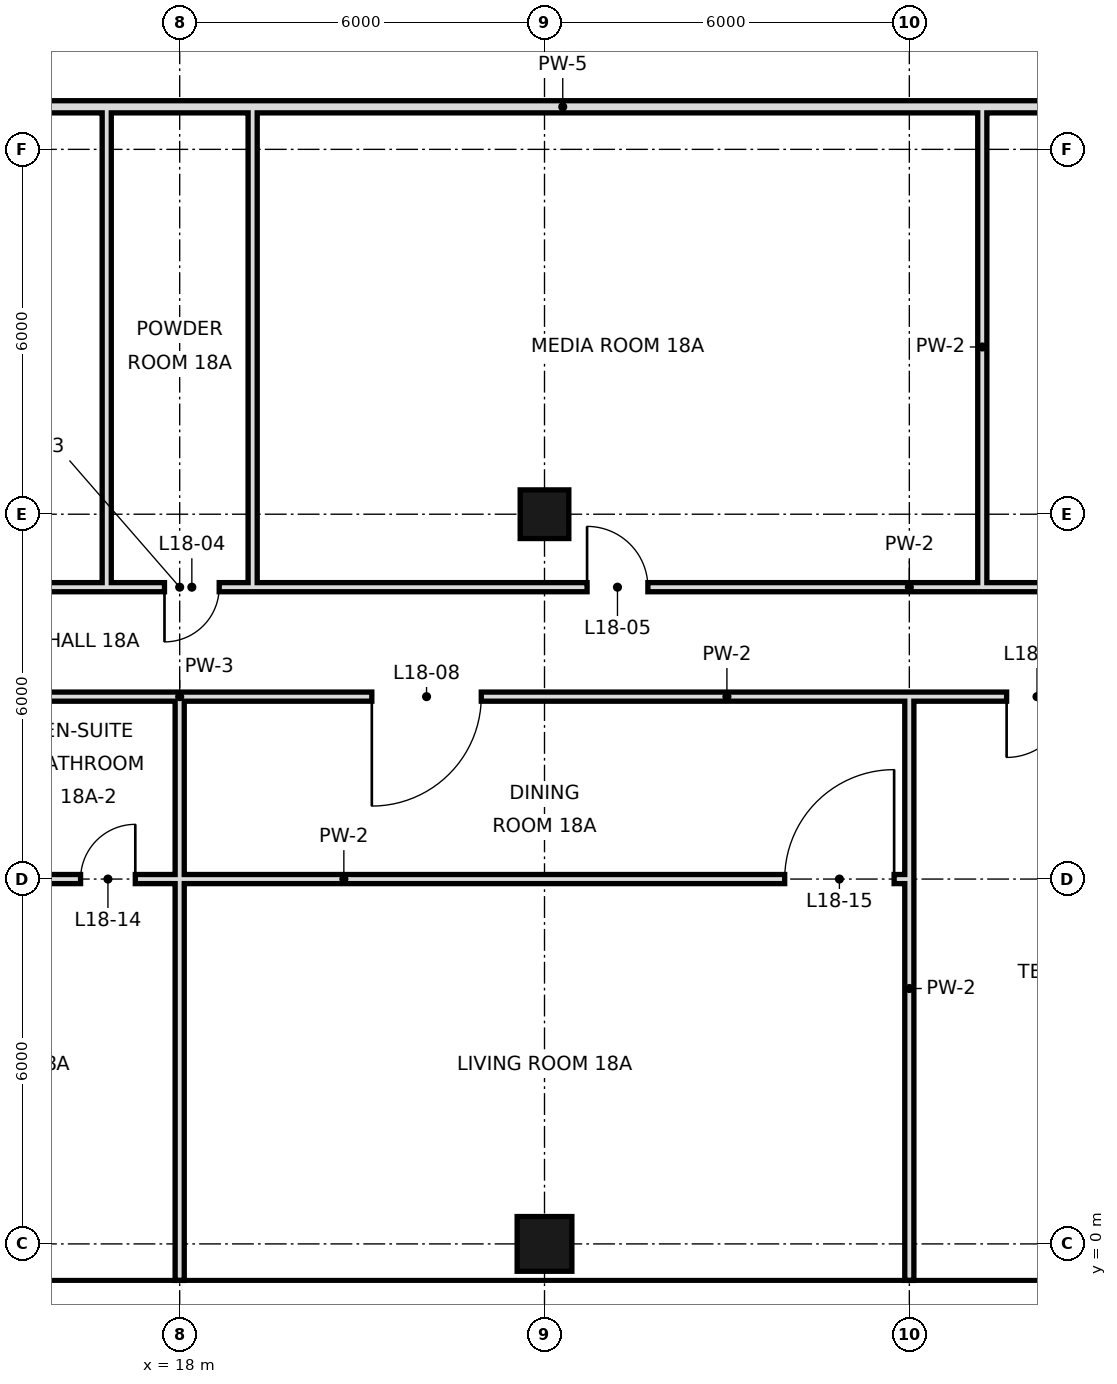
"""IFC4 building model, lengths in metres.
Left out: names, types, materials, properties, quantities, classifications, styles, units other than length and angle.
Written with IfcOpenShell. Run it as: python <this file> out.ifc"""

import sys

from ifc_helpers import new_model, si_unit, direction, frame, frame_2d, origin, origin_2d, place, context, subcontext, project, spatial, rectangle, hollow_rectangle, extrude, element, fill, save


model = new_model("IFC4")
c1 = context("Model", 3, precision=1e-05, world=origin(), true_north=direction((0.0, 1.0)))
c2 = subcontext(c1, "Body", "Model", "MODEL_VIEW")
j1 = project(units=[si_unit("LENGTHUNIT", "METRE"), si_unit("PLANEANGLEUNIT", "RADIAN")], contexts=[c1])
p1 = place(None, origin())
s1 = spatial("IfcSite", under=j1, at=p1, CompositionType="ELEMENT")
p2 = place(p1, origin())
s2 = spatial("IfcBuilding", under=s1, at=p2, CompositionType="ELEMENT")
p3 = place(p2, frame((0.0, 0.0, 85.8)))
s3 = spatial("IfcBuildingStorey", under=s2, at=p3, CompositionType="ELEMENT", Elevation=85.8)
p4 = place(p3, frame((24.0, 0.0, 0.0), z_axis=(0.0, 0.0, 1.0), x_axis=(1.0, 0.0, 0.0)))
e1 = element("IfcColumn", 1, at=p4, inside=s3, PredefinedType="COLUMN", context=c2, shape_type="SweptSolid", body=[
    extrude(hollow_rectangle(XDim=0.9, YDim=0.9, WallThickness=0.045, at=origin_2d()), origin(), (0.0, 0.0, 1.0), 4.4),
])
p5 = place(p3, frame((24.0, 12.0, 0.0), z_axis=(0.0, 0.0, 1.0), x_axis=(1.0, 0.0, 0.0)))
e2 = element("IfcColumn", 2, at=p5, inside=s3, PredefinedType="COLUMN", context=c2, shape_type="SweptSolid", body=[
    extrude(hollow_rectangle(XDim=0.8, YDim=0.8, WallThickness=0.04, at=origin_2d()), origin(), (0.0, 0.0, 1.0), 4.4),
])
p6 = place(p3, frame((16.8, 10.8, 0.0), z_axis=(0.0, 0.0, 1.0), x_axis=(0.0, 1.0, 0.0)))
e3 = element("IfcWall", 3, at=p6, inside=s3, PredefinedType="PARTITIONING", context=c2, shape_type="SweptSolid", body=[
    extrude(rectangle(XDim=7.9, YDim=0.15, at=frame_2d((3.95, 0.0))), origin(), (0.0, 0.0, 1.0), 4.1),
])
p7 = place(p3, frame((18.0, -0.6, 0.0), z_axis=(0.0, 0.0, 1.0), x_axis=(0.0, 1.0, 0.0)))
e4 = element("IfcWall", 4, at=p7, inside=s3, PredefinedType="PARTITIONING", context=c2, shape_type="SweptSolid", body=[
    extrude(rectangle(XDim=6.6, YDim=0.15, at=frame_2d((3.3, 0.0))), origin(), (0.0, 0.0, 1.0), 3.4),
])
p8 = place(p3, frame((18.0, 6.0, 0.0), z_axis=(0.0, 0.0, 1.0), x_axis=(0.0, 1.0, 0.0)))
e5 = element("IfcWall", 5, at=p8, inside=s3, PredefinedType="PARTITIONING", context=c2, shape_type="SweptSolid", body=[
    extrude(rectangle(XDim=3.0, YDim=0.15, at=frame_2d((1.5, 0.0))), origin(), (0.0, 0.0, 1.0), 3.4),
])
p9 = place(p3, frame((19.2, 10.8, 0.0), z_axis=(0.0, 0.0, 1.0), x_axis=(0.0, 1.0, 0.0)))
e6 = element("IfcWall", 6, at=p9, inside=s3, PredefinedType="PARTITIONING", context=c2, shape_type="SweptSolid", body=[
    extrude(rectangle(XDim=7.9, YDim=0.15, at=frame_2d((3.95, 0.0))), origin(), (0.0, 0.0, 1.0), 4.1),
])
p10 = place(p3, frame((30.0, -0.6, 0.0), z_axis=(0.0, 0.0, 1.0), x_axis=(0.0, 1.0, 0.0)))
e7 = element("IfcWall", 7, at=p10, inside=s3, PredefinedType="PARTITIONING", context=c2, shape_type="SweptSolid", body=[
    extrude(rectangle(XDim=9.6, YDim=0.15, at=frame_2d((4.8, 0.0))), origin(), (0.0, 0.0, 1.0), 3.4),
])
p11 = place(p3, frame((31.2, 10.8, 0.0), z_axis=(0.0, 0.0, 1.0), x_axis=(0.0, 1.0, 0.0)))
e8 = element("IfcWall", 8, at=p11, inside=s3, PredefinedType="PARTITIONING", context=c2, shape_type="SweptSolid", body=[
    extrude(rectangle(XDim=7.9, YDim=0.15, at=frame_2d((3.95, 0.0))), origin(), (0.0, 0.0, 1.0), 4.1),
])
p12 = place(p3, frame((5.4, 10.8, 0.0), z_axis=(0.0, 0.0, 1.0), x_axis=(1.0, 0.0, 0.0)))
e9 = element("IfcWall", 9, at=p12, inside=s3, PredefinedType="PARTITIONING", context=c2, shape_type="SweptSolid", body=[
    extrude(rectangle(XDim=11.4, YDim=0.15, at=frame_2d((5.7, 0.0))), origin(), (0.0, 0.0, 1.0), 4.1),
])
p13 = place(p12, frame((7.18, 0.0, 0.0)))
e10 = element("IfcOpeningElement", 10, at=p13, cuts=e9, PredefinedType="OPENING", context=c2, shape_type="SweptSolid", body=[
    extrude(rectangle(XDim=1.0, YDim=2.4, at=frame_2d((0.5, 1.2))), frame((0.0, 0.085, 0.0), z_axis=(0.0, -1.0, 0.0), x_axis=(1.0, 0.0, 0.0)), (0.0, 0.0, 1.0), 0.17),
])
p14 = place(p3, frame((19.2, 10.8, 0.0), z_axis=(0.0, 0.0, 1.0), x_axis=(1.0, 0.0, 0.0)))
e11 = element("IfcWall", 11, at=p14, inside=s3, PredefinedType="PARTITIONING", context=c2, shape_type="SweptSolid", body=[
    extrude(rectangle(XDim=21.6, YDim=0.15, at=frame_2d((10.8, 0.0))), origin(), (0.0, 0.0, 1.0), 4.1),
])
p15 = place(p14, frame((13.9, 0.0, 0.0)))
e12 = element("IfcOpeningElement", 12, at=p15, cuts=e11, PredefinedType="OPENING", context=c2, shape_type="SweptSolid", body=[
    extrude(rectangle(XDim=1.0, YDim=2.4, at=frame_2d((0.5, 1.2))), frame((0.0, 0.085, 0.0), z_axis=(0.0, -1.0, 0.0), x_axis=(1.0, 0.0, 0.0)), (0.0, 0.0, 1.0), 0.17),
])
p16 = place(p14, frame((5.5, 0.0, 0.0)))
e13 = element("IfcOpeningElement", 13, at=p16, cuts=e11, PredefinedType="OPENING", context=c2, shape_type="SweptSolid", body=[
    extrude(rectangle(XDim=1.0, YDim=2.4, at=frame_2d((0.5, 1.2))), frame((0.0, 0.085, 0.0), z_axis=(0.0, -1.0, 0.0), x_axis=(1.0, 0.0, 0.0)), (0.0, 0.0, 1.0), 0.17),
])
p17 = place(p14, frame((19.36, 0.0, 0.0)))
e14 = element("IfcOpeningElement", 14, at=p17, cuts=e11, PredefinedType="OPENING", context=c2, shape_type="SweptSolid", body=[
    extrude(rectangle(XDim=1.0, YDim=2.4, at=frame_2d((0.5, 1.2))), frame((0.0, 0.085, 0.0), z_axis=(0.0, -1.0, 0.0), x_axis=(1.0, 0.0, 0.0)), (0.0, 0.0, 1.0), 0.17),
])
p18 = place(p3, frame((16.8, 10.8, 0.0), z_axis=(0.0, 0.0, 1.0), x_axis=(1.0, 0.0, 0.0)))
e15 = element("IfcWall", 15, at=p18, inside=s3, PredefinedType="PARTITIONING", context=c2, shape_type="SweptSolid", body=[
    extrude(rectangle(XDim=2.4, YDim=0.15, at=frame_2d((1.2, 0.0))), origin(), (0.0, 0.0, 1.0), 4.1),
])
p19 = place(p18, frame((0.95, 0.0, 0.0)))
e16 = element("IfcOpeningElement", 16, at=p19, cuts=e15, PredefinedType="OPENING", context=c2, shape_type="SweptSolid", body=[
    extrude(rectangle(XDim=0.9, YDim=2.4, at=frame_2d((0.45, 1.2))), frame((0.0, 0.085, 0.0), z_axis=(0.0, -1.0, 0.0), x_axis=(1.0, 0.0, 0.0)), (0.0, 0.0, 1.0), 0.17),
])
p20 = place(p3, frame((5.4, 18.7, 0.0), z_axis=(0.0, 0.0, 1.0), x_axis=(1.0, 0.0, 0.0)))
e17 = element("IfcWall", 17, at=p20, inside=s3, PredefinedType="SOLIDWALL", context=c2, shape_type="SweptSolid", body=[
    extrude(rectangle(XDim=37.8, YDim=0.2, at=frame_2d((18.9, 0.0))), origin(), (0.0, 0.0, 1.0), 3.4),
])
p21 = place(p20, frame((27.6, 0.0, 0.0)))
e18 = element("IfcOpeningElement", 18, at=p21, cuts=e17, PredefinedType="OPENING", context=c2, shape_type="SweptSolid", body=[
    extrude(rectangle(XDim=1.2, YDim=2.4, at=frame_2d((0.6, 1.2))), frame((0.0, 0.11, 0.0), z_axis=(0.0, -1.0, 0.0), x_axis=(1.0, 0.0, 0.0)), (0.0, 0.0, 1.0), 0.22),
])
p22 = place(p20, frame((32.4, 0.0, 0.0)))
e19 = element("IfcOpeningElement", 19, at=p22, cuts=e17, PredefinedType="OPENING", context=c2, shape_type="SweptSolid", body=[
    extrude(rectangle(XDim=1.2, YDim=2.4, at=frame_2d((0.6, 1.2))), frame((0.0, 0.11, 0.0), z_axis=(0.0, -1.0, 0.0), x_axis=(1.0, 0.0, 0.0)), (0.0, 0.0, 1.0), 0.22),
])
p23 = place(p3, frame((18.0, 6.0, 0.0), z_axis=(0.0, 0.0, 1.0), x_axis=(1.0, 0.0, 0.0)))
e20 = element("IfcWall", 20, at=p23, inside=s3, PredefinedType="PARTITIONING", context=c2, shape_type="SweptSolid", body=[
    extrude(rectangle(XDim=12.0, YDim=0.15, at=frame_2d((6.0, 0.0))), origin(), (0.0, 0.0, 1.0), 3.65),
])
p24 = place(p23, frame((9.95, 0.0, 0.0)))
e21 = element("IfcOpeningElement", 21, at=p24, cuts=e20, PredefinedType="OPENING", context=c2, shape_type="SweptSolid", body=[
    extrude(rectangle(XDim=1.8, YDim=2.4, at=frame_2d((0.9, 1.2))), frame((0.0, 0.085, 0.0), z_axis=(0.0, -1.0, 0.0), x_axis=(1.0, 0.0, 0.0)), (0.0, 0.0, 1.0), 0.17),
])
p25 = place(p3, frame((15.0, 6.0, 0.0), z_axis=(0.0, 0.0, 1.0), x_axis=(1.0, 0.0, 0.0)))
e22 = element("IfcWall", 22, at=p25, inside=s3, PredefinedType="PARTITIONING", context=c2, shape_type="SweptSolid", body=[
    extrude(rectangle(XDim=3.0, YDim=0.15, at=frame_2d((1.5, 0.0))), origin(), (0.0, 0.0, 1.0), 3.65),
])
p26 = place(p25, frame((1.37, 0.0, 0.0)))
e23 = element("IfcOpeningElement", 23, at=p26, cuts=e22, PredefinedType="OPENING", context=c2, shape_type="SweptSolid", body=[
    extrude(rectangle(XDim=0.9, YDim=2.4, at=frame_2d((0.45, 1.2))), frame((0.0, 0.085, 0.0), z_axis=(0.0, -1.0, 0.0), x_axis=(1.0, 0.0, 0.0)), (0.0, 0.0, 1.0), 0.17),
])
p27 = place(p3, frame((18.0, 9.0, 0.0), z_axis=(0.0, 0.0, 1.0), x_axis=(1.0, 0.0, 0.0)))
e24 = element("IfcWall", 24, at=p27, inside=s3, PredefinedType="PARTITIONING", context=c2, shape_type="SweptSolid", body=[
    extrude(rectangle(XDim=18.0, YDim=0.15, at=frame_2d((9.0, 0.0))), origin(), (0.0, 0.0, 1.0), 4.1),
])
p28 = place(p27, frame((3.16, 0.0, 0.0)))
e25 = element("IfcOpeningElement", 25, at=p28, cuts=e24, PredefinedType="OPENING", context=c2, shape_type="SweptSolid", body=[
    extrude(rectangle(XDim=1.8, YDim=2.4, at=frame_2d((0.9, 1.2))), frame((0.0, 0.085, 0.0), z_axis=(0.0, -1.0, 0.0), x_axis=(1.0, 0.0, 0.0)), (0.0, 0.0, 1.0), 0.17),
])
p29 = place(p27, frame((13.6, 0.0, 0.0)))
e26 = element("IfcOpeningElement", 26, at=p29, cuts=e24, PredefinedType="OPENING", context=c2, shape_type="SweptSolid", body=[
    extrude(rectangle(XDim=1.0, YDim=2.4, at=frame_2d((0.5, 1.2))), frame((0.0, 0.085, 0.0), z_axis=(0.0, -1.0, 0.0), x_axis=(1.0, 0.0, 0.0)), (0.0, 0.0, 1.0), 0.17),
])
p30 = place(p3, frame((15.0, 9.0, 0.0), z_axis=(0.0, 0.0, 1.0), x_axis=(1.0, 0.0, 0.0)))
e27 = element("IfcWall", 27, at=p30, inside=s3, PredefinedType="PARTITIONING", context=c2, shape_type="SweptSolid", body=[
    extrude(rectangle(XDim=3.0, YDim=0.15, at=frame_2d((1.5, 0.0))), origin(), (0.0, 0.0, 1.0), 4.1),
])
p31 = place(p19, frame((0.9, 0.0, 0.0), z_axis=(0.0, 0.0, 1.0), x_axis=(-1.0, 0.0, 0.0)))
e28 = element("IfcDoor", 28, at=p31, inside=s3, OperationType="SINGLE_SWING_RIGHT", PredefinedType="DOOR", context=c2, shape_type="SweptSolid", body=[
    extrude(rectangle(XDim=0.9, YDim=2.4, at=frame_2d((0.45, 1.2))), frame((0.0, 0.025, 0.0), z_axis=(0.0, -1.0, 0.0), x_axis=(1.0, 0.0, 0.0)), (0.0, 0.0, 1.0), 0.05),
])
fill(e16, e28)
p32 = place(p16, origin())
e29 = element("IfcDoor", 29, at=p32, inside=s3, OperationType="SINGLE_SWING_LEFT", PredefinedType="DOOR", context=c2, shape_type="SweptSolid", body=[
    extrude(rectangle(XDim=1.0, YDim=2.4, at=frame_2d((0.5, 1.2))), frame((0.0, 0.025, 0.0), z_axis=(0.0, -1.0, 0.0), x_axis=(1.0, 0.0, 0.0)), (0.0, 0.0, 1.0), 0.05),
])
fill(e13, e29)
p33 = place(p28, frame((1.8, 0.0, 0.0), z_axis=(0.0, 0.0, 1.0), x_axis=(-1.0, 0.0, 0.0)))
e30 = element("IfcDoor", 30, at=p33, inside=s3, OperationType="SINGLE_SWING_RIGHT", PredefinedType="DOOR", context=c2, shape_type="SweptSolid", body=[
    extrude(rectangle(XDim=1.8, YDim=2.4, at=frame_2d((0.9, 1.2))), frame((0.0, 0.025, 0.0), z_axis=(0.0, -1.0, 0.0), x_axis=(1.0, 0.0, 0.0)), (0.0, 0.0, 1.0), 0.05),
])
fill(e25, e30)
p34 = place(p29, frame((1.0, 0.0, 0.0), z_axis=(0.0, 0.0, 1.0), x_axis=(-1.0, 0.0, 0.0)))
e31 = element("IfcDoor", 31, at=p34, inside=s3, OperationType="SINGLE_SWING_RIGHT", PredefinedType="DOOR", context=c2, shape_type="SweptSolid", body=[
    extrude(rectangle(XDim=1.0, YDim=2.4, at=frame_2d((0.5, 1.2))), frame((0.0, 0.025, 0.0), z_axis=(0.0, -1.0, 0.0), x_axis=(1.0, 0.0, 0.0)), (0.0, 0.0, 1.0), 0.05),
])
fill(e26, e31)
p35 = place(p26, frame((0.9, 0.0, 0.0), z_axis=(0.0, 0.0, 1.0), x_axis=(-1.0, 0.0, 0.0)))
e32 = element("IfcDoor", 32, at=p35, inside=s3, OperationType="SINGLE_SWING_LEFT", PredefinedType="DOOR", context=c2, shape_type="SweptSolid", body=[
    extrude(rectangle(XDim=0.9, YDim=2.4, at=frame_2d((0.45, 1.2))), frame((0.0, 0.025, 0.0), z_axis=(0.0, -1.0, 0.0), x_axis=(1.0, 0.0, 0.0)), (0.0, 0.0, 1.0), 0.05),
])
fill(e23, e32)
p36 = place(p24, frame((1.8, 0.0, 0.0), z_axis=(0.0, 0.0, 1.0), x_axis=(-1.0, 0.0, 0.0)))
e33 = element("IfcDoor", 33, at=p36, inside=s3, OperationType="SINGLE_SWING_LEFT", PredefinedType="DOOR", context=c2, shape_type="SweptSolid", body=[
    extrude(rectangle(XDim=1.8, YDim=2.4, at=frame_2d((0.9, 1.2))), frame((0.0, 0.025, 0.0), z_axis=(0.0, -1.0, 0.0), x_axis=(1.0, 0.0, 0.0)), (0.0, 0.0, 1.0), 0.05),
])
fill(e21, e33)
save(model, sys.argv[1])
